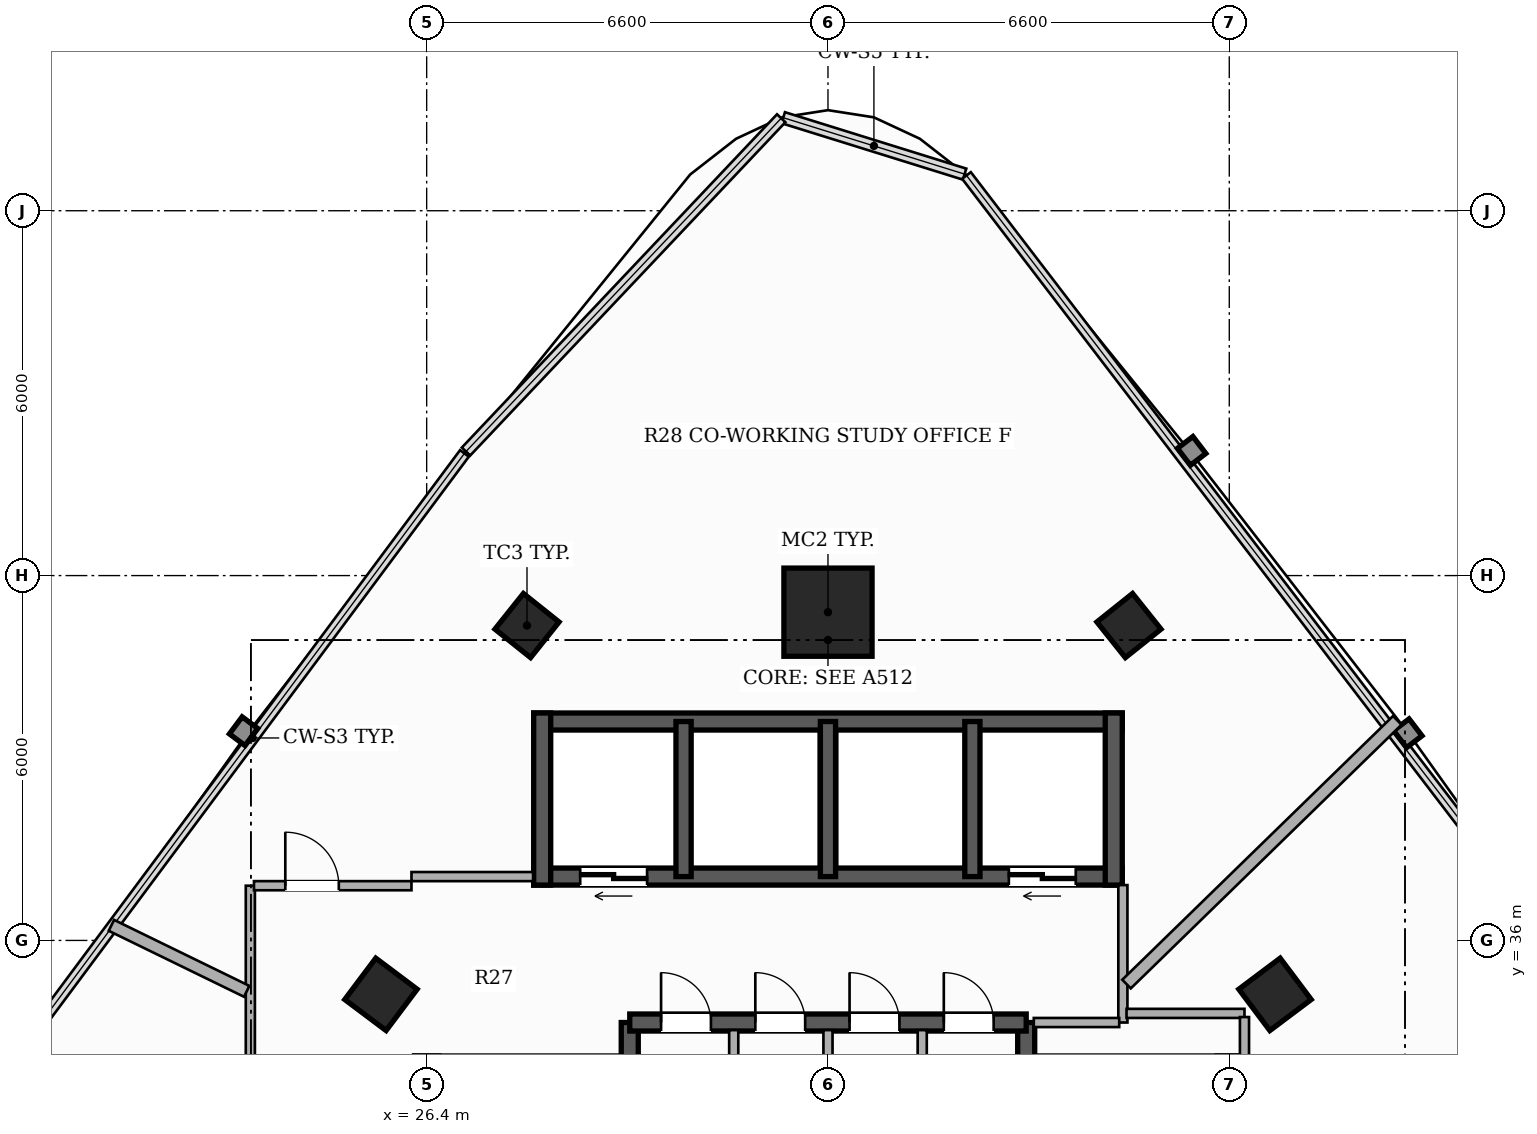
"""IFC4 building model, lengths in metres.
Left out: names, types, materials, properties, quantities, classifications, styles, units other than length and angle.
Written with IfcOpenShell. Run it as: python <this file> out.ifc"""

import sys

from ifc_helpers import new_model, si_unit, direction, frame, frame_2d, origin, origin_2d, place, context, subcontext, project, spatial, rectangle, hollow_rectangle, extrude, element, fill, save


model = new_model("IFC4")
c1 = context("Model", 3, precision=1e-05, world=origin(), true_north=direction((0.0, 1.0)))
c2 = subcontext(c1, "Body", "Model", "MODEL_VIEW")
j1 = project(units=[si_unit("LENGTHUNIT", "METRE"), si_unit("PLANEANGLEUNIT", "RADIAN")], contexts=[c1])
p1 = place(None, origin())
s1 = spatial("IfcSite", under=j1, at=p1, CompositionType="ELEMENT")
p2 = place(p1, origin())
s2 = spatial("IfcBuilding", under=s1, at=p2, CompositionType="ELEMENT")
p3 = place(p2, frame((0.0, 0.0, 106.7)))
s3 = spatial("IfcBuildingStorey", under=s2, at=p3, CompositionType="ELEMENT", Elevation=106.7)
p4 = place(p3, frame((29.74, 26.5, 0.0), z_axis=(0.0, 0.0, 1.0), x_axis=(0.0, 1.0, 0.0)))
e1 = element("IfcWall", 1, at=p4, inside=s3, PredefinedType="SHEAR", context=c2, shape_type="SweptSolid", body=[
    extrude(rectangle(XDim=8.15, YDim=0.28, at=frame_2d((4.075, 0.0))), origin(), (0.0, 0.0, 1.0), 3.3),
])
p5 = place(p4, frame((0.6, 0.0, 0.0)))
e2 = element("IfcOpeningElement", 2, at=p5, cuts=e1, PredefinedType="OPENING", context=c2, shape_type="SweptSolid", body=[
    extrude(rectangle(XDim=1.05, YDim=2.15, at=frame_2d((0.525, 1.075))), frame((0.0, 0.15, 0.0), z_axis=(0.0, -1.0, 0.0), x_axis=(1.0, 0.0, 0.0)), (0.0, 0.0, 1.0), 0.3),
])
p6 = place(p3, frame((36.26, 26.5, 0.0), z_axis=(0.0, 0.0, 1.0), x_axis=(0.0, 1.0, 0.0)))
e3 = element("IfcWall", 3, at=p6, inside=s3, PredefinedType="SHEAR", context=c2, shape_type="SweptSolid", body=[
    extrude(rectangle(XDim=8.15, YDim=0.28, at=frame_2d((4.075, 0.0))), origin(), (0.0, 0.0, 1.0), 3.3),
])
p7 = place(p6, frame((0.6, 0.0, 0.0)))
e4 = element("IfcOpeningElement", 4, at=p7, cuts=e3, PredefinedType="OPENING", context=c2, shape_type="SweptSolid", body=[
    extrude(rectangle(XDim=1.05, YDim=2.15, at=frame_2d((0.525, 1.075))), frame((0.0, 0.15, 0.0), z_axis=(0.0, -1.0, 0.0), x_axis=(1.0, 0.0, 0.0)), (0.0, 0.0, 1.0), 0.3),
])
p8 = place(p3, frame((29.74, 34.65, 0.0), z_axis=(0.0, 0.0, 1.0), x_axis=(1.0, 0.0, 0.0)))
e5 = element("IfcWall", 5, at=p8, inside=s3, PredefinedType="SHEAR", context=c2, shape_type="SweptSolid", body=[
    extrude(rectangle(XDim=6.52, YDim=0.28, at=frame_2d((3.26, 0.0))), origin(), (0.0, 0.0, 1.0), 3.3),
])
p9 = place(p8, frame((0.515, 0.0, 0.0)))
e6 = element("IfcOpeningElement", 6, at=p9, cuts=e5, PredefinedType="OPENING", context=c2, shape_type="SweptSolid", body=[
    extrude(rectangle(XDim=0.82, YDim=2.1, at=frame_2d((0.41, 1.05))), frame((0.0, 0.15, 0.0), z_axis=(0.0, -1.0, 0.0), x_axis=(1.0, 0.0, 0.0)), (0.0, 0.0, 1.0), 0.3),
])
p10 = place(p8, frame((2.065, 0.0, 0.0)))
e7 = element("IfcOpeningElement", 7, at=p10, cuts=e5, PredefinedType="OPENING", context=c2, shape_type="SweptSolid", body=[
    extrude(rectangle(XDim=0.82, YDim=2.1, at=frame_2d((0.41, 1.05))), frame((0.0, 0.15, 0.0), z_axis=(0.0, -1.0, 0.0), x_axis=(1.0, 0.0, 0.0)), (0.0, 0.0, 1.0), 0.3),
])
p11 = place(p8, frame((3.615, 0.0, 0.0)))
e8 = element("IfcOpeningElement", 8, at=p11, cuts=e5, PredefinedType="OPENING", context=c2, shape_type="SweptSolid", body=[
    extrude(rectangle(XDim=0.82, YDim=2.1, at=frame_2d((0.41, 1.05))), frame((0.0, 0.15, 0.0), z_axis=(0.0, -1.0, 0.0), x_axis=(1.0, 0.0, 0.0)), (0.0, 0.0, 1.0), 0.3),
])
p12 = place(p8, frame((5.165, 0.0, 0.0)))
e9 = element("IfcOpeningElement", 9, at=p12, cuts=e5, PredefinedType="OPENING", context=c2, shape_type="SweptSolid", body=[
    extrude(rectangle(XDim=0.82, YDim=2.1, at=frame_2d((0.41, 1.05))), frame((0.0, 0.15, 0.0), z_axis=(0.0, -1.0, 0.0), x_axis=(1.0, 0.0, 0.0)), (0.0, 0.0, 1.0), 0.3),
])
p13 = place(p3, frame((37.84, 37.05, 0.0), z_axis=(0.0, 0.0, 1.0), x_axis=(-1.0, 0.0, 0.0)))
e10 = element("IfcWall", 10, at=p13, inside=s3, PredefinedType="SHEAR", context=c2, shape_type="SweptSolid", body=[
    extrude(rectangle(XDim=9.68, YDim=0.28, at=frame_2d((4.84, 0.0))), origin(), (0.0, 0.0, 1.0), 3.3),
])
p14 = place(p13, frame((7.815, 0.0, 0.0)))
e11 = element("IfcOpeningElement", 11, at=p14, cuts=e10, PredefinedType="OPENING", context=c2, shape_type="SweptSolid", body=[
    extrude(rectangle(XDim=1.1, YDim=2.2, at=frame_2d((0.55, 1.1))), frame((0.0, 0.15, 0.0), z_axis=(0.0, -1.0, 0.0), x_axis=(1.0, 0.0, 0.0)), (0.0, 0.0, 1.0), 0.3),
])
p15 = place(p13, frame((0.765, 0.0, 0.0)))
e12 = element("IfcOpeningElement", 12, at=p15, cuts=e10, PredefinedType="OPENING", context=c2, shape_type="SweptSolid", body=[
    extrude(rectangle(XDim=1.1, YDim=2.2, at=frame_2d((0.55, 1.1))), frame((0.0, 0.15, 0.0), z_axis=(0.0, -1.0, 0.0), x_axis=(1.0, 0.0, 0.0)), (0.0, 0.0, 1.0), 0.3),
])
p16 = place(p3, frame((28.16, 39.6, 0.0), z_axis=(0.0, 0.0, 1.0), x_axis=(1.0, 0.0, 0.0)))
e13 = element("IfcWall", 13, at=p16, inside=s3, PredefinedType="SHEAR", context=c2, shape_type="SweptSolid", body=[
    extrude(rectangle(XDim=9.68, YDim=0.28, at=frame_2d((4.84, 0.0))), origin(), (0.0, 0.0, 1.0), 3.3),
])
for number, where, z_axis, x_axis in (
    (14, (28.3, 36.91, 0.0), (0.0, 0.0, 1.0), (0.0, 1.0, 0.0)),
    (15, (37.7, 36.91, 0.0), (0.0, 0.0, 1.0), (0.0, 1.0, 0.0)),
):
    element("IfcWall", number, at=place(p3, frame(where, z_axis=z_axis, x_axis=x_axis)), inside=s3, PredefinedType="SHEAR", context=c2, shape_type="SweptSolid", body=[
        extrude(rectangle(XDim=2.83, YDim=0.28, at=frame_2d((1.415, 0.0))), origin(), (0.0, 0.0, 1.0), 3.3),
    ])
for number, where, z_axis, x_axis in (
    (16, (30.625, 37.05, 0.0), (0.0, 0.0, 1.0), (0.0, 1.0, 0.0)),
    (17, (33.0, 37.05, 0.0), (0.0, 0.0, 1.0), (0.0, 1.0, 0.0)),
    (18, (35.375, 37.05, 0.0), (0.0, 0.0, 1.0), (0.0, 1.0, 0.0)),
):
    element("IfcWall", number, at=place(p3, frame(where, z_axis=z_axis, x_axis=x_axis)), inside=s3, PredefinedType="SHEAR", context=c2, shape_type="SweptSolid", body=[
        extrude(rectangle(XDim=2.55, YDim=0.25, at=frame_2d((1.275, 0.0))), origin(), (0.0, 0.0, 1.0), 3.3),
    ])
p17 = place(p3, frame((33.0, 41.398, 0.0), z_axis=(0.0, 0.0, 1.0), x_axis=(1.0, 0.0, 0.0)))
e19 = element("IfcColumn", 19, at=p17, inside=s3, PredefinedType="COLUMN", context=c2, shape_type="SweptSolid", body=[
    extrude(hollow_rectangle(XDim=1.45, YDim=1.45, WallThickness=0.045, at=origin_2d()), origin(), (0.0, 0.0, 1.0), 3.3),
])
for number, where, z_axis, x_axis in (
    (20, (25.648, 35.113, 0.0), (0.0, 0.0, 1.0), (0.6, 0.8, 0.0)),
    (21, (40.352, 35.113, 0.0), (0.0, 0.0, 1.0), (-0.6, 0.8, 0.0)),
):
    element("IfcColumn", number, at=place(p3, frame(where, z_axis=z_axis, x_axis=x_axis)), inside=s3, PredefinedType="COLUMN", context=c2, shape_type="SweptSolid", body=[
        extrude(hollow_rectangle(XDim=0.85, YDim=0.85, WallThickness=0.028, at=origin_2d()), origin(), (0.0, 0.0, 1.0), 3.3),
    ])
for number, where, z_axis, x_axis in (
    (22, (28.05, 41.178, 0.0), (0.0, 0.0, 1.0), (0.624, 0.782, 0.0)),
    (23, (37.95, 41.178, 0.0), (0.0, 0.0, 1.0), (-0.624, 0.782, 0.0)),
):
    element("IfcColumn", number, at=place(p3, frame(where, z_axis=z_axis, x_axis=x_axis)), inside=s3, PredefinedType="COLUMN", context=c2, shape_type="SweptSolid", body=[
        extrude(hollow_rectangle(XDim=0.75, YDim=0.75, WallThickness=0.025, at=origin_2d()), origin(), (0.0, 0.0, 1.0), 3.3),
    ])
p18 = place(p3, frame((37.85, 34.65, 0.0), z_axis=(0.0, 0.0, 1.0), x_axis=(0.0, 1.0, 0.0)))
e24 = element("IfcWall", 24, at=p18, inside=s3, PredefinedType="PARTITIONING", context=c2, shape_type="SweptSolid", body=[
    extrude(rectangle(XDim=2.26, YDim=0.15, at=frame_2d((1.13, 0.0))), origin(), (0.0, 0.0, 1.0), 3.06),
])
p19 = place(p3, frame((36.385, 34.65, 0.0), z_axis=(0.0, 0.0, 1.0), x_axis=(1.0, 0.0, 0.0)))
e25 = element("IfcWall", 25, at=p19, inside=s3, PredefinedType="PARTITIONING", context=c2, shape_type="SweptSolid", body=[
    extrude(rectangle(XDim=1.405, YDim=0.15, at=frame_2d((0.703, 0.0))), origin(), (0.0, 0.0, 1.0), 2.425),
])
for number, where, z_axis, x_axis in (
    (26, (31.45, 32.915, 0.0), (0.0, 0.0, 1.0), (0.0, 1.0, 0.0)),
    (27, (33.0, 32.915, 0.0), (0.0, 0.0, 1.0), (0.0, 1.0, 0.0)),
    (28, (34.55, 32.915, 0.0), (0.0, 0.0, 1.0), (0.0, 1.0, 0.0)),
):
    element("IfcWall", number, at=place(p3, frame(where, z_axis=z_axis, x_axis=x_axis)), inside=s3, PredefinedType="PARTITIONING", context=c2, shape_type="SweptSolid", body=[
        extrude(rectangle(XDim=1.61, YDim=0.15, at=frame_2d((0.805, 0.0))), origin(), (0.0, 0.0, 1.0), 3.06),
    ])
p20 = place(p3, frame((23.5, 14.06, 0.0), z_axis=(0.0, 0.0, 1.0), x_axis=(0.0, 1.0, 0.0)))
e29 = element("IfcWall", 29, at=p20, inside=s3, PredefinedType="PARTITIONING", context=c2, shape_type="SweptSolid", body=[
    extrude(rectangle(XDim=22.84, YDim=0.15, at=frame_2d((11.42, 0.0))), origin(), (0.0, 0.0, 1.0), 2.413),
])
p21 = place(p20, frame((13.373, 0.0, 0.0)))
e30 = element("IfcOpeningElement", 30, at=p21, cuts=e29, PredefinedType="OPENING", context=c2, shape_type="SweptSolid", body=[
    extrude(rectangle(XDim=0.88, YDim=2.1, at=frame_2d((0.44, 1.05))), frame((0.0, 0.085, 0.0), z_axis=(0.0, -1.0, 0.0), x_axis=(1.0, 0.0, 0.0)), (0.0, 0.0, 1.0), 0.17),
])
p22 = place(p20, frame((3.002, 0.0, 0.0)))
e31 = element("IfcOpeningElement", 31, at=p22, cuts=e29, PredefinedType="OPENING", context=c2, shape_type="SweptSolid", body=[
    extrude(rectangle(XDim=0.92, YDim=2.15, at=frame_2d((0.46, 1.075))), frame((0.0, 0.085, 0.0), z_axis=(0.0, -1.0, 0.0), x_axis=(1.0, 0.0, 0.0)), (0.0, 0.0, 1.0), 0.17),
])
p23 = place(p3, frame((23.56, 36.9, 0.0), z_axis=(0.0, 0.0, 1.0), x_axis=(1.0, 0.0, 0.0)))
e32 = element("IfcWall", 32, at=p23, inside=s3, PredefinedType="PARTITIONING", context=c2, shape_type="SweptSolid", body=[
    extrude(rectangle(XDim=2.59, YDim=0.15, at=frame_2d((1.295, 0.0))), origin(), (0.0, 0.0, 1.0), 2.413),
])
p24 = place(p23, frame((0.515, 0.0, 0.0)))
e33 = element("IfcOpeningElement", 33, at=p24, cuts=e32, PredefinedType="OPENING", context=c2, shape_type="SweptSolid", body=[
    extrude(rectangle(XDim=0.88, YDim=2.1, at=frame_2d((0.44, 1.05))), frame((0.0, 0.085, 0.0), z_axis=(0.0, -1.0, 0.0), x_axis=(1.0, 0.0, 0.0)), (0.0, 0.0, 1.0), 0.17),
])
p25 = place(p3, frame((26.15, 37.05, 0.0), z_axis=(0.0, 0.0, 1.0), x_axis=(1.0, 0.0, 0.0)))
e34 = element("IfcWall", 34, at=p25, inside=s3, PredefinedType="PARTITIONING", context=c2, shape_type="SweptSolid", body=[
    extrude(rectangle(XDim=2.0, YDim=0.15, at=frame_2d((1.0, 0.0))), origin(), (0.0, 0.0, 1.0), 2.413),
])
p26 = place(p3, frame((37.91, 34.8, 0.0), z_axis=(0.0, 0.0, 1.0), x_axis=(1.0, 0.0, 0.0)))
e35 = element("IfcWall", 35, at=p26, inside=s3, PredefinedType="PARTITIONING", context=c2, shape_type="SweptSolid", body=[
    extrude(rectangle(XDim=1.94, YDim=0.15, at=frame_2d((0.97, 0.0))), origin(), (0.0, 0.0, 1.0), 2.721),
])
p27 = place(p3, frame((39.85, 34.74, 0.0), z_axis=(0.0, 0.0, 1.0), x_axis=(0.0, -1.0, 0.0)))
e36 = element("IfcWall", 36, at=p27, inside=s3, PredefinedType="PARTITIONING", context=c2, shape_type="SweptSolid", body=[
    extrude(rectangle(XDim=0.64, YDim=0.15, at=frame_2d((0.32, 0.0))), origin(), (0.0, 0.0, 1.0), 2.721),
])
p28 = place(p3, frame((21.215, 36.248, 0.0), z_axis=(0.0, 0.0, 1.0), x_axis=(0.898821522371, -0.438314808012, 0.0)))
e37 = element("IfcWall", 37, at=p28, inside=s3, PredefinedType="PARTITIONING", context=c2, shape_type="SweptSolid", body=[
    extrude(rectangle(XDim=2.475, YDim=0.2, at=frame_2d((1.238, 0.0))), origin(), (0.0, 0.0, 1.0), 3.06),
])
p29 = place(p3, frame((37.91, 35.282, 0.0), z_axis=(0.0, 0.0, 1.0), x_axis=(0.716392659664, 0.697697324905, 0.0)))
e38 = element("IfcWall", 38, at=p29, inside=s3, PredefinedType="PARTITIONING", context=c2, shape_type="SweptSolid", body=[
    extrude(rectangle(XDim=6.216, YDim=0.2, at=frame_2d((3.108, 0.0))), origin(), (0.0, 0.0, 1.0), 2.413),
])
p30 = place(p14, origin())
e39 = element("IfcDoor", 39, at=p30, inside=s3, OperationType="DOUBLE_DOOR_SLIDING", PredefinedType="DOOR", context=c2, shape_type="SweptSolid", body=[
    extrude(rectangle(XDim=1.1, YDim=2.2, at=frame_2d((0.55, 1.1))), frame((0.0, 0.025, 0.0), z_axis=(0.0, -1.0, 0.0), x_axis=(1.0, 0.0, 0.0)), (0.0, 0.0, 1.0), 0.05),
])
fill(e11, e39)
p31 = place(p15, origin())
e40 = element("IfcDoor", 40, at=p31, inside=s3, OperationType="DOUBLE_DOOR_SLIDING", PredefinedType="DOOR", context=c2, shape_type="SweptSolid", body=[
    extrude(rectangle(XDim=1.1, YDim=2.2, at=frame_2d((0.55, 1.1))), frame((0.0, 0.025, 0.0), z_axis=(0.0, -1.0, 0.0), x_axis=(1.0, 0.0, 0.0)), (0.0, 0.0, 1.0), 0.05),
])
fill(e12, e40)
p32 = place(p9, origin())
e41 = element("IfcDoor", 41, at=p32, inside=s3, OperationType="SINGLE_SWING_LEFT", PredefinedType="DOOR", context=c2, shape_type="SweptSolid", body=[
    extrude(rectangle(XDim=0.82, YDim=2.1, at=frame_2d((0.41, 1.05))), frame((0.0, 0.025, 0.0), z_axis=(0.0, -1.0, 0.0), x_axis=(1.0, 0.0, 0.0)), (0.0, 0.0, 1.0), 0.05),
])
fill(e6, e41)
p33 = place(p10, origin())
e42 = element("IfcDoor", 42, at=p33, inside=s3, OperationType="SINGLE_SWING_LEFT", PredefinedType="DOOR", context=c2, shape_type="SweptSolid", body=[
    extrude(rectangle(XDim=0.82, YDim=2.1, at=frame_2d((0.41, 1.05))), frame((0.0, 0.025, 0.0), z_axis=(0.0, -1.0, 0.0), x_axis=(1.0, 0.0, 0.0)), (0.0, 0.0, 1.0), 0.05),
])
fill(e7, e42)
p34 = place(p11, origin())
e43 = element("IfcDoor", 43, at=p34, inside=s3, OperationType="SINGLE_SWING_LEFT", PredefinedType="DOOR", context=c2, shape_type="SweptSolid", body=[
    extrude(rectangle(XDim=0.82, YDim=2.1, at=frame_2d((0.41, 1.05))), frame((0.0, 0.025, 0.0), z_axis=(0.0, -1.0, 0.0), x_axis=(1.0, 0.0, 0.0)), (0.0, 0.0, 1.0), 0.05),
])
fill(e8, e43)
p35 = place(p12, origin())
e44 = element("IfcDoor", 44, at=p35, inside=s3, OperationType="SINGLE_SWING_LEFT", PredefinedType="DOOR", context=c2, shape_type="SweptSolid", body=[
    extrude(rectangle(XDim=0.82, YDim=2.1, at=frame_2d((0.41, 1.05))), frame((0.0, 0.025, 0.0), z_axis=(0.0, -1.0, 0.0), x_axis=(1.0, 0.0, 0.0)), (0.0, 0.0, 1.0), 0.05),
])
fill(e9, e44)
p36 = place(p24, origin())
e45 = element("IfcDoor", 45, at=p36, inside=s3, OperationType="SINGLE_SWING_LEFT", PredefinedType="DOOR", context=c2, shape_type="SweptSolid", body=[
    extrude(rectangle(XDim=0.88, YDim=2.1, at=frame_2d((0.44, 1.05))), frame((0.0, 0.025, 0.0), z_axis=(0.0, -1.0, 0.0), x_axis=(1.0, 0.0, 0.0)), (0.0, 0.0, 1.0), 0.05),
])
fill(e33, e45)
save(model, sys.argv[1])
